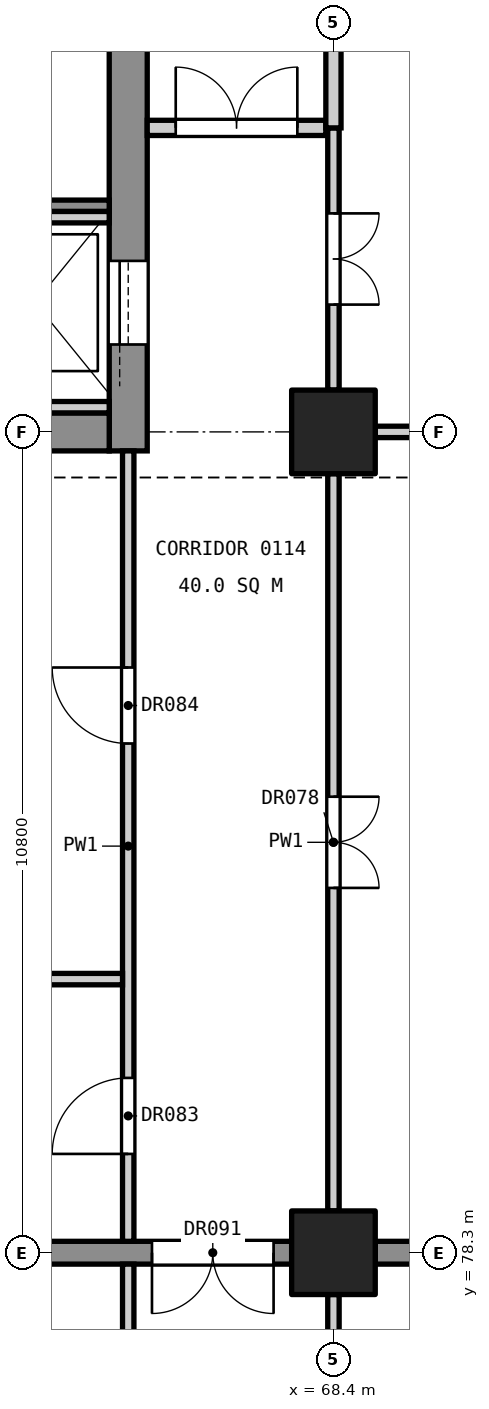
"""IFC4 building model, lengths in metres.
Left out: names, types, materials, properties, quantities, classifications, styles, units other than length and angle.
Written with IfcOpenShell. Run it as: python <this file> out.ifc"""

import sys

from ifc_helpers import new_model, si_unit, direction, frame, frame_2d, origin, origin_2d, place, context, subcontext, project, spatial, rectangle, extrude, element, fill, save


model = new_model("IFC4")
c1 = context("Model", 3, precision=1e-05, world=origin(), true_north=direction((0.0, 1.0)))
c2 = subcontext(c1, "Body", "Model", "MODEL_VIEW")
j1 = project(units=[si_unit("LENGTHUNIT", "METRE"), si_unit("PLANEANGLEUNIT", "RADIAN")], contexts=[c1])
p1 = place(None, origin())
s1 = spatial("IfcSite", under=j1, at=p1, CompositionType="ELEMENT")
p2 = place(p1, origin())
s2 = spatial("IfcBuilding", under=s1, at=p2, CompositionType="ELEMENT")
p3 = place(p2, frame((0.0, 0.0, 6.0)))
s3 = spatial("IfcBuildingStorey", under=s2, at=p3, CompositionType="ELEMENT", Elevation=6.0)
for number, where, z_axis, x_axis in (
    (1, (68.4, 78.3, 0.0), (0.0, 0.0, 1.0), (1.0, 0.0, 0.0)),
    (2, (68.4, 89.1, 0.0), (0.0, 0.0, 1.0), (1.0, 0.0, 0.0)),
):
    element("IfcColumn", number, at=place(p3, frame(where, z_axis=z_axis, x_axis=x_axis)), inside=s3, PredefinedType="COLUMN", context=c2, shape_type="SweptSolid", body=[
        extrude(rectangle(XDim=1.1, YDim=1.1, at=origin_2d()), origin(), (0.0, 0.0, 1.0), 5.4),
    ])
p4 = place(p3, frame((65.7, 88.85, 0.0), z_axis=(0.0, 0.0, 1.0), x_axis=(0.0, 1.0, 0.0)))
e3 = element("IfcWall", 3, at=p4, inside=s3, PredefinedType="SHEAR", context=c2, shape_type="SweptSolid", body=[
    extrude(rectangle(XDim=11.3, YDim=0.5, at=frame_2d((5.65, 0.0))), origin(), (0.0, 0.0, 1.0), 5.1),
])
p5 = place(p4, frame((9.35, 0.0, 0.0)))
e4 = element("IfcOpeningElement", 4, at=p5, cuts=e3, PredefinedType="OPENING", context=c2, shape_type="SweptSolid", body=[
    extrude(rectangle(XDim=1.4, YDim=2.1, at=frame_2d((0.7, 1.05))), frame((0.0, 0.26, 0.0), z_axis=(0.0, -1.0, 0.0), x_axis=(1.0, 0.0, 0.0)), (0.0, 0.0, 1.0), 0.52),
])
p6 = place(p4, frame((1.4, 0.0, 0.0)))
e5 = element("IfcOpeningElement", 5, at=p6, cuts=e3, PredefinedType="OPENING", context=c2, shape_type="SweptSolid", body=[
    extrude(rectangle(XDim=1.1, YDim=2.1, at=frame_2d((0.55, 1.05))), frame((0.0, 0.26, 0.0), z_axis=(0.0, -1.0, 0.0), x_axis=(1.0, 0.0, 0.0)), (0.0, 0.0, 1.0), 0.52),
])
p7 = place(p3, frame((61.45, 89.1, 0.0), z_axis=(0.0, 0.0, 1.0), x_axis=(1.0, 0.0, 0.0)))
e6 = element("IfcWall", 6, at=p7, inside=s3, PredefinedType="SHEAR", context=c2, shape_type="SweptSolid", body=[
    extrude(rectangle(XDim=4.0, YDim=0.5, at=frame_2d((2.0, 0.0))), origin(), (0.0, 0.0, 1.0), 5.1),
])
p8 = place(p3, frame((61.75, 78.3, 0.0), z_axis=(0.0, 0.0, 1.0), x_axis=(1.0, 0.0, 0.0)))
e7 = element("IfcWall", 7, at=p8, inside=s3, PredefinedType="SHEAR", context=c2, shape_type="SweptSolid", body=[
    extrude(rectangle(XDim=6.1, YDim=0.3, at=frame_2d((3.05, 0.0))), origin(), (0.0, 0.0, 1.0), 5.1),
])
p9 = place(p8, frame((4.262, 0.0, 0.0)))
e8 = element("IfcOpeningElement", 8, at=p9, cuts=e7, PredefinedType="OPENING", context=c2, shape_type="SweptSolid", body=[
    extrude(rectangle(XDim=1.6, YDim=2.1, at=frame_2d((0.8, 1.05))), frame((0.0, 0.16, 0.0), z_axis=(0.0, -1.0, 0.0), x_axis=(1.0, 0.0, 0.0)), (0.0, 0.0, 1.0), 0.32),
])
p10 = place(p3, frame((68.95, 78.3, 0.0), z_axis=(0.0, 0.0, 1.0), x_axis=(1.0, 0.0, 0.0)))
e9 = element("IfcWall", 9, at=p10, inside=s3, PredefinedType="SHEAR", context=c2, shape_type="SweptSolid", body=[
    extrude(rectangle(XDim=9.7, YDim=0.3, at=frame_2d((4.85, 0.0))), origin(), (0.0, 0.0, 1.0), 5.1),
])
p11 = place(p3, frame((61.45, 92.075, 0.0), z_axis=(0.0, 0.0, 1.0), x_axis=(1.0, 0.0, 0.0)))
e10 = element("IfcWall", 10, at=p11, inside=s3, PredefinedType="SOLIDWALL", context=c2, shape_type="SweptSolid", body=[
    extrude(rectangle(XDim=4.0, YDim=0.15, at=frame_2d((2.0, 0.0))), origin(), (0.0, 0.0, 1.0), 5.1),
])
for number, where, z_axis, x_axis in (
    (11, (63.65, 91.925, 0.0), (0.0, 0.0, 1.0), (1.0, 0.0, 0.0)),
    (12, (63.65, 89.425, 0.0), (0.0, 0.0, 1.0), (1.0, 0.0, 0.0)),
):
    element("IfcWall", number, at=place(p3, frame(where, z_axis=z_axis, x_axis=x_axis)), inside=s3, PredefinedType="SOLIDWALL", context=c2, shape_type="SweptSolid", body=[
        extrude(rectangle(XDim=1.8, YDim=0.15, at=frame_2d((0.9, 0.0))), origin(), (0.0, 0.0, 1.0), 5.4),
    ])
p12 = place(p3, frame((65.7, 74.95, 0.0), z_axis=(0.0, 0.0, 1.0), x_axis=(0.0, 1.0, 0.0)))
e13 = element("IfcWall", 13, at=p12, inside=s3, PredefinedType="PARTITIONING", context=c2, shape_type="SweptSolid", body=[
    extrude(rectangle(XDim=3.2, YDim=0.15, at=frame_2d((1.6, 0.0))), origin(), (0.0, 0.0, 1.0), 4.0),
])
p13 = place(p12, frame((1.05, 0.0, 0.0)))
e14 = element("IfcOpeningElement", 14, at=p13, cuts=e13, PredefinedType="OPENING", context=c2, shape_type="SweptSolid", body=[
    extrude(rectangle(XDim=1.0, YDim=2.1, at=frame_2d((0.5, 1.05))), frame((0.0, 0.085, 0.0), z_axis=(0.0, -1.0, 0.0), x_axis=(1.0, 0.0, 0.0)), (0.0, 0.0, 1.0), 0.17),
])
p14 = place(p3, frame((65.7, 78.45, 0.0), z_axis=(0.0, 0.0, 1.0), x_axis=(0.0, 1.0, 0.0)))
e15 = element("IfcWall", 15, at=p14, inside=s3, PredefinedType="PARTITIONING", context=c2, shape_type="SweptSolid", body=[
    extrude(rectangle(XDim=10.4, YDim=0.15, at=frame_2d((5.2, 0.0))), origin(), (0.0, 0.0, 1.0), 4.0),
])
p15 = place(p14, frame((1.15, 0.0, 0.0)))
e16 = element("IfcOpeningElement", 16, at=p15, cuts=e15, PredefinedType="OPENING", context=c2, shape_type="SweptSolid", body=[
    extrude(rectangle(XDim=1.0, YDim=2.1, at=frame_2d((0.5, 1.05))), frame((0.0, 0.085, 0.0), z_axis=(0.0, -1.0, 0.0), x_axis=(1.0, 0.0, 0.0)), (0.0, 0.0, 1.0), 0.17),
])
p16 = place(p14, frame((6.55, 0.0, 0.0)))
e17 = element("IfcOpeningElement", 17, at=p16, cuts=e15, PredefinedType="OPENING", context=c2, shape_type="SweptSolid", body=[
    extrude(rectangle(XDim=1.0, YDim=2.1, at=frame_2d((0.5, 1.05))), frame((0.0, 0.085, 0.0), z_axis=(0.0, -1.0, 0.0), x_axis=(1.0, 0.0, 0.0)), (0.0, 0.0, 1.0), 0.17),
])
p17 = place(p3, frame((61.35, 81.9, 0.0), z_axis=(0.0, 0.0, 1.0), x_axis=(1.0, 0.0, 0.0)))
e18 = element("IfcWall", 18, at=p17, inside=s3, PredefinedType="PARTITIONING", context=c2, shape_type="SweptSolid", body=[
    extrude(rectangle(XDim=4.275, YDim=0.15, at=frame_2d((2.137, 0.0))), origin(), (0.0, 0.0, 1.0), 4.3),
])
p18 = place(p3, frame((65.95, 93.1, 0.0), z_axis=(0.0, 0.0, 1.0), x_axis=(1.0, 0.0, 0.0)))
e19 = element("IfcWall", 19, at=p18, inside=s3, PredefinedType="PARTITIONING", context=c2, shape_type="SweptSolid", body=[
    extrude(rectangle(XDim=2.35, YDim=0.2, at=frame_2d((1.175, 0.0))), origin(), (0.0, 0.0, 1.0), 4.0),
])
p19 = place(p18, frame((0.375, 0.0, 0.0)))
e20 = element("IfcOpeningElement", 20, at=p19, cuts=e19, PredefinedType="OPENING", context=c2, shape_type="SweptSolid", body=[
    extrude(rectangle(XDim=1.6, YDim=2.1, at=frame_2d((0.8, 1.05))), frame((0.0, 0.11, 0.0), z_axis=(0.0, -1.0, 0.0), x_axis=(1.0, 0.0, 0.0)), (0.0, 0.0, 1.0), 0.22),
])
p20 = place(p3, frame((68.4, 70.8, 0.0), z_axis=(0.0, 0.0, 1.0), x_axis=(0.0, 1.0, 0.0)))
e21 = element("IfcWall", 21, at=p20, inside=s3, PredefinedType="PARTITIONING", context=c2, shape_type="SweptSolid", body=[
    extrude(rectangle(XDim=6.95, YDim=0.15, at=frame_2d((3.475, 0.0))), origin(), (0.0, 0.0, 1.0), 4.0),
])
p21 = place(p20, frame((2.875, 0.0, 0.0)))
e22 = element("IfcOpeningElement", 22, at=p21, cuts=e21, PredefinedType="OPENING", context=c2, shape_type="SweptSolid", body=[
    extrude(rectangle(XDim=1.2, YDim=2.1, at=frame_2d((0.6, 1.05))), frame((0.0, 0.085, 0.0), z_axis=(0.0, -1.0, 0.0), x_axis=(1.0, 0.0, 0.0)), (0.0, 0.0, 1.0), 0.17),
])
p22 = place(p3, frame((68.4, 78.85, 0.0), z_axis=(0.0, 0.0, 1.0), x_axis=(0.0, 1.0, 0.0)))
e23 = element("IfcWall", 23, at=p22, inside=s3, PredefinedType="PARTITIONING", context=c2, shape_type="SweptSolid", body=[
    extrude(rectangle(XDim=9.7, YDim=0.15, at=frame_2d((4.85, 0.0))), origin(), (0.0, 0.0, 1.0), 4.0),
])
p23 = place(p22, frame((4.25, 0.0, 0.0)))
e24 = element("IfcOpeningElement", 24, at=p23, cuts=e23, PredefinedType="OPENING", context=c2, shape_type="SweptSolid", body=[
    extrude(rectangle(XDim=1.2, YDim=2.1, at=frame_2d((0.6, 1.05))), frame((0.0, 0.085, 0.0), z_axis=(0.0, -1.0, 0.0), x_axis=(1.0, 0.0, 0.0)), (0.0, 0.0, 1.0), 0.17),
])
p24 = place(p3, frame((68.4, 89.65, 0.0), z_axis=(0.0, 0.0, 1.0), x_axis=(0.0, 1.0, 0.0)))
e25 = element("IfcWall", 25, at=p24, inside=s3, PredefinedType="PARTITIONING", context=c2, shape_type="SweptSolid", body=[
    extrude(rectangle(XDim=3.45, YDim=0.15, at=frame_2d((1.725, 0.0))), origin(), (0.0, 0.0, 1.0), 4.0),
])
p25 = place(p24, frame((1.125, 0.0, 0.0)))
e26 = element("IfcOpeningElement", 26, at=p25, cuts=e25, PredefinedType="OPENING", context=c2, shape_type="SweptSolid", body=[
    extrude(rectangle(XDim=1.2, YDim=2.1, at=frame_2d((0.6, 1.05))), frame((0.0, 0.085, 0.0), z_axis=(0.0, -1.0, 0.0), x_axis=(1.0, 0.0, 0.0)), (0.0, 0.0, 1.0), 0.17),
])
p26 = place(p3, frame((68.4, 93.1, 0.0), z_axis=(0.0, 0.0, 1.0), x_axis=(0.0, 1.0, 0.0)))
e27 = element("IfcWall", 27, at=p26, inside=s3, PredefinedType="PARTITIONING", context=c2, shape_type="SweptSolid", body=[
    extrude(rectangle(XDim=6.25, YDim=0.2, at=frame_2d((3.125, 0.0))), origin(), (0.0, 0.0, 1.0), 4.0),
])
p27 = place(p3, frame((68.95, 89.1, 0.0), z_axis=(0.0, 0.0, 1.0), x_axis=(1.0, 0.0, 0.0)))
e28 = element("IfcWall", 28, at=p27, inside=s3, PredefinedType="PARTITIONING", context=c2, shape_type="SweptSolid", body=[
    extrude(rectangle(XDim=9.7, YDim=0.15, at=frame_2d((4.85, 0.0))), origin(), (0.0, 0.0, 1.0), 4.3),
])
p28 = place(p6, origin())
e29 = element("IfcDoor", 29, at=p28, inside=s3, OperationType="SLIDING_TO_LEFT", PredefinedType="DOOR", context=c2, shape_type="SweptSolid", body=[
    extrude(rectangle(XDim=1.1, YDim=2.1, at=frame_2d((0.55, 1.05))), frame((0.0, 0.025, 0.0), z_axis=(0.0, -1.0, 0.0), x_axis=(1.0, 0.0, 0.0)), (0.0, 0.0, 1.0), 0.05),
])
fill(e5, e29)
p29 = place(p23, frame((1.2, 0.0, 0.0), z_axis=(0.0, 0.0, 1.0), x_axis=(-1.0, 0.0, 0.0)))
e30 = element("IfcDoor", 30, at=p29, inside=s3, OperationType="DOUBLE_DOOR_SINGLE_SWING", PredefinedType="DOOR", context=c2, shape_type="SweptSolid", body=[
    extrude(rectangle(XDim=1.2, YDim=2.1, at=frame_2d((0.6, 1.05))), frame((0.0, 0.025, 0.0), z_axis=(0.0, -1.0, 0.0), x_axis=(1.0, 0.0, 0.0)), (0.0, 0.0, 1.0), 0.05),
])
fill(e24, e30)
p30 = place(p25, frame((1.2, 0.0, 0.0), z_axis=(0.0, 0.0, 1.0), x_axis=(-1.0, 0.0, 0.0)))
e31 = element("IfcDoor", 31, at=p30, inside=s3, OperationType="DOUBLE_DOOR_SINGLE_SWING", PredefinedType="DOOR", context=c2, shape_type="SweptSolid", body=[
    extrude(rectangle(XDim=1.2, YDim=2.1, at=frame_2d((0.6, 1.05))), frame((0.0, 0.025, 0.0), z_axis=(0.0, -1.0, 0.0), x_axis=(1.0, 0.0, 0.0)), (0.0, 0.0, 1.0), 0.05),
])
fill(e26, e31)
p31 = place(p15, origin())
e32 = element("IfcDoor", 32, at=p31, inside=s3, OperationType="SINGLE_SWING_LEFT", PredefinedType="DOOR", context=c2, shape_type="SweptSolid", body=[
    extrude(rectangle(XDim=1.0, YDim=2.1, at=frame_2d((0.5, 1.05))), frame((0.0, 0.025, 0.0), z_axis=(0.0, -1.0, 0.0), x_axis=(1.0, 0.0, 0.0)), (0.0, 0.0, 1.0), 0.05),
])
fill(e16, e32)
p32 = place(p16, origin())
e33 = element("IfcDoor", 33, at=p32, inside=s3, OperationType="SINGLE_SWING_RIGHT", PredefinedType="DOOR", context=c2, shape_type="SweptSolid", body=[
    extrude(rectangle(XDim=1.0, YDim=2.1, at=frame_2d((0.5, 1.05))), frame((0.0, 0.025, 0.0), z_axis=(0.0, -1.0, 0.0), x_axis=(1.0, 0.0, 0.0)), (0.0, 0.0, 1.0), 0.05),
])
fill(e17, e33)
p33 = place(p19, origin())
e34 = element("IfcDoor", 34, at=p33, inside=s3, OperationType="DOUBLE_DOOR_SINGLE_SWING", PredefinedType="DOOR", context=c2, shape_type="SweptSolid", body=[
    extrude(rectangle(XDim=1.6, YDim=2.1, at=frame_2d((0.8, 1.05))), frame((0.0, 0.025, 0.0), z_axis=(0.0, -1.0, 0.0), x_axis=(1.0, 0.0, 0.0)), (0.0, 0.0, 1.0), 0.05),
])
fill(e20, e34)
p34 = place(p9, frame((1.6, 0.0, 0.0), z_axis=(0.0, 0.0, 1.0), x_axis=(-1.0, 0.0, 0.0)))
e35 = element("IfcDoor", 35, at=p34, inside=s3, OperationType="DOUBLE_DOOR_SINGLE_SWING", PredefinedType="DOOR", context=c2, shape_type="SweptSolid", body=[
    extrude(rectangle(XDim=1.6, YDim=2.1, at=frame_2d((0.8, 1.05))), frame((0.0, 0.025, 0.0), z_axis=(0.0, -1.0, 0.0), x_axis=(1.0, 0.0, 0.0)), (0.0, 0.0, 1.0), 0.05),
])
fill(e8, e35)
save(model, sys.argv[1])
